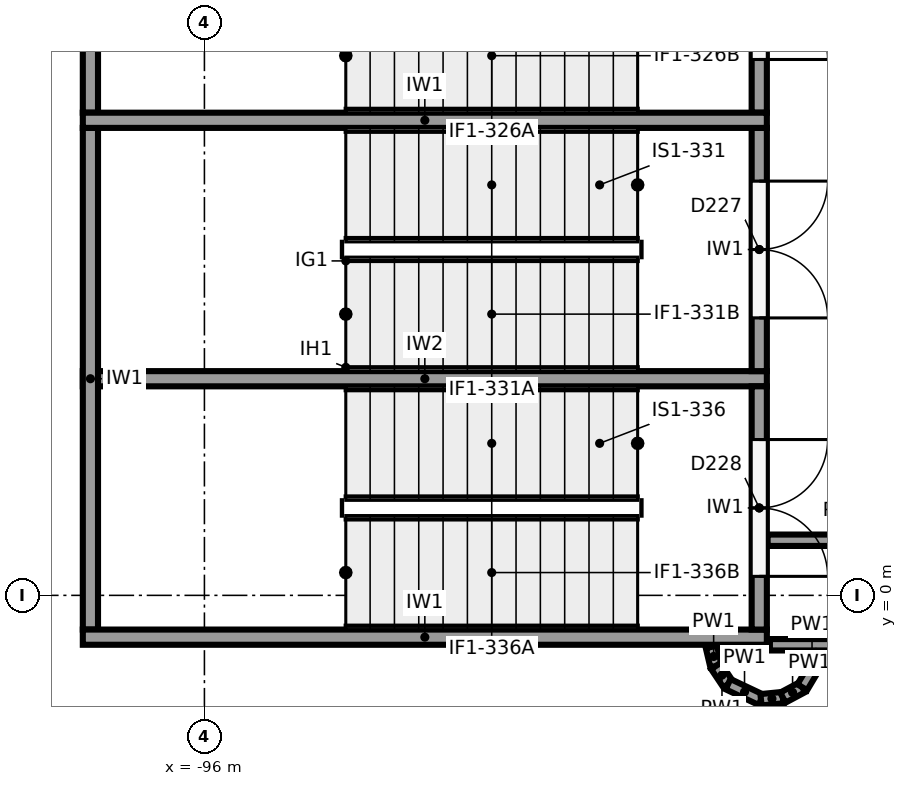
"""IFC4 building model, lengths in metres.
Left out: names, types, materials, properties, quantities, classifications, styles, units other than length and angle.
Written with IfcOpenShell. Run it as: python <this file> out.ifc"""

import sys

from ifc_helpers import new_model, si_unit, direction, frame, frame_2d, origin, place, context, subcontext, project, spatial, rectangle, extrude, element, fill, save


model = new_model("IFC4")
c1 = context("Model", 3, precision=1e-05, world=origin(), true_north=direction((0.0, 1.0)))
c2 = subcontext(c1, "Body", "Model", "MODEL_VIEW")
j1 = project(units=[si_unit("LENGTHUNIT", "METRE"), si_unit("PLANEANGLEUNIT", "RADIAN")], contexts=[c1])
p1 = place(None, origin())
s1 = spatial("IfcSite", under=j1, at=p1, CompositionType="ELEMENT")
p2 = place(p1, origin())
s2 = spatial("IfcBuilding", under=s1, at=p2, CompositionType="ELEMENT")
p3 = place(p2, frame((0.0, 0.0, -4.0)))
s3 = spatial("IfcBuildingStorey", under=s2, at=p3, CompositionType="ELEMENT", Elevation=-4.0)
for number, where, z_axis, x_axis in (
    (1, (-97.6, 6.25, -1.2), (0.0, 0.0, 1.0), (1.0, 0.0, 0.0)),
    (2, (-97.6, -0.55, -1.2), (0.0, 0.0, 1.0), (1.0, 0.0, 0.0)),
):
    element("IfcWall", number, at=place(p3, frame(where, z_axis=z_axis, x_axis=x_axis)), inside=s3, PredefinedType="SHEAR", context=c2, shape_type="SweptSolid", body=[
        extrude(rectangle(XDim=9.0, YDim=0.2, at=frame_2d((4.5, 0.0))), origin(), (0.0, 0.0, 1.0), 4.8),
    ])
for number, where, z_axis, x_axis in (
    (3, (-97.5, 12.95, -1.2), (0.0, 0.0, 1.0), (0.0, -1.0, 0.0)),
    (4, (-97.5, 6.15, -1.2), (0.0, 0.0, 1.0), (0.0, -1.0, 0.0)),
):
    element("IfcWall", number, at=place(p3, frame(where, z_axis=z_axis, x_axis=x_axis)), inside=s3, PredefinedType="SHEAR", context=c2, shape_type="SweptSolid", body=[
        extrude(rectangle(XDim=6.6, YDim=0.2, at=frame_2d((3.3, 0.0))), origin(), (0.0, 0.0, 1.0), 4.8),
    ])
p4 = place(p3, frame((-97.6, 2.85, -1.2), z_axis=(0.0, 0.0, 1.0), x_axis=(1.0, 0.0, 0.0)))
e5 = element("IfcWall", 5, at=p4, inside=s3, PredefinedType="SHEAR", context=c2, shape_type="SweptSolid", body=[
    extrude(rectangle(XDim=9.0, YDim=0.2, at=frame_2d((4.5, 0.0))), origin(), (0.0, 0.0, 1.0), 4.8),
])
p5 = place(p3, frame((-88.7, 9.55, -1.2), z_axis=(0.0, 0.0, 1.0), x_axis=(0.0, -1.0, 0.0)))
e6 = element("IfcWall", 6, at=p5, inside=s3, PredefinedType="SHEAR", context=c2, shape_type="SweptSolid", body=[
    extrude(rectangle(XDim=3.2, YDim=0.2, at=frame_2d((1.6, 0.0))), origin(), (0.0, 0.0, 1.0), 4.8),
])
p6 = place(p5, frame((0.7, 0.0, 1.2)))
e7 = element("IfcOpeningElement", 7, at=p6, cuts=e6, PredefinedType="OPENING", context=c2, shape_type="SweptSolid", body=[
    extrude(rectangle(XDim=1.8, YDim=2.1, at=frame_2d((0.9, 1.05))), frame((0.0, 0.11, 0.0), z_axis=(0.0, -1.0, 0.0), x_axis=(1.0, 0.0, 0.0)), (0.0, 0.0, 1.0), 0.22),
])
p7 = place(p3, frame((-88.7, 6.15, -1.2), z_axis=(0.0, 0.0, 1.0), x_axis=(0.0, -1.0, 0.0)))
e8 = element("IfcWall", 8, at=p7, inside=s3, PredefinedType="SHEAR", context=c2, shape_type="SweptSolid", body=[
    extrude(rectangle(XDim=3.2, YDim=0.2, at=frame_2d((1.6, 0.0))), origin(), (0.0, 0.0, 1.0), 4.8),
])
p8 = place(p7, frame((0.7, 0.0, 1.2)))
e9 = element("IfcOpeningElement", 9, at=p8, cuts=e8, PredefinedType="OPENING", context=c2, shape_type="SweptSolid", body=[
    extrude(rectangle(XDim=1.8, YDim=2.1, at=frame_2d((0.9, 1.05))), frame((0.0, 0.11, 0.0), z_axis=(0.0, -1.0, 0.0), x_axis=(1.0, 0.0, 0.0)), (0.0, 0.0, 1.0), 0.22),
])
p9 = place(p3, frame((-88.7, 2.75, -1.2), z_axis=(0.0, 0.0, 1.0), x_axis=(0.0, -1.0, 0.0)))
e10 = element("IfcWall", 10, at=p9, inside=s3, PredefinedType="SHEAR", context=c2, shape_type="SweptSolid", body=[
    extrude(rectangle(XDim=3.2, YDim=0.2, at=frame_2d((1.6, 0.0))), origin(), (0.0, 0.0, 1.0), 4.8),
])
p10 = place(p9, frame((0.7, 0.0, 1.2)))
e11 = element("IfcOpeningElement", 11, at=p10, cuts=e10, PredefinedType="OPENING", context=c2, shape_type="SweptSolid", body=[
    extrude(rectangle(XDim=1.8, YDim=2.1, at=frame_2d((0.9, 1.05))), frame((0.0, 0.11, 0.0), z_axis=(0.0, -1.0, 0.0), x_axis=(1.0, 0.0, 0.0)), (0.0, 0.0, 1.0), 0.22),
])
p11 = place(p3, frame((-88.56, -0.65, 0.0), z_axis=(0.0, 0.0, 1.0), x_axis=(1.0, 0.0, 0.0)))
e12 = element("IfcWall", 12, at=p11, inside=s3, PredefinedType="PARTITIONING", context=c2, shape_type="SweptSolid", body=[
    extrude(rectangle(XDim=2.983, YDim=0.15, at=frame_2d((1.491, 0.0))), origin(), (0.0, 0.0, 1.0), 3.6),
])
p12 = place(p11, frame((0.95, 0.0, 0.0)))
e13 = element("IfcOpeningElement", 13, at=p12, cuts=e12, PredefinedType="OPENING", context=c2, shape_type="SweptSolid", body=[
    extrude(rectangle(XDim=1.0, YDim=2.1, at=frame_2d((0.5, 1.05))), frame((0.0, 0.085, 0.0), z_axis=(0.0, -1.0, 0.0), x_axis=(1.0, 0.0, 0.0)), (0.0, 0.0, 1.0), 0.17),
])
p13 = place(p3, frame((-88.59, 0.725, 0.0), z_axis=(0.0, 0.0, 1.0), x_axis=(1.0, 0.0, 0.0)))
e14 = element("IfcWall", 14, at=p13, inside=s3, PredefinedType="PARTITIONING", context=c2, shape_type="SweptSolid", body=[
    extrude(rectangle(XDim=2.465, YDim=0.15, at=frame_2d((1.232, 0.0))), origin(), (0.0, 0.0, 1.0), 3.6),
])
p14 = place(p3, frame((-89.33, -0.678, 0.0), z_axis=(0.0, 0.0, 1.0), x_axis=(0.230253879357, -0.973130593004, 0.0)))
e15 = element("IfcWall", 15, at=p14, inside=s3, PredefinedType="PARTITIONING", context=c2, shape_type="SweptSolid", body=[
    extrude(rectangle(XDim=0.258, YDim=0.15, at=frame_2d((0.129, 0.0))), origin(), (0.0, 0.0, 1.0), 3.6),
])
p15 = place(p3, frame((-89.271, -0.929, 0.0), z_axis=(0.0, 0.0, 1.0), x_axis=(0.555678694372, -0.831397130511, 0.0)))
e16 = element("IfcWall", 16, at=p15, inside=s3, PredefinedType="PARTITIONING", context=c2, shape_type="SweptSolid", body=[
    extrude(rectangle(XDim=0.288, YDim=0.15, at=frame_2d((0.144, 0.0))), origin(), (0.0, 0.0, 1.0), 3.6),
])
p16 = place(p3, frame((-89.111, -1.168, 0.0), z_axis=(0.0, 0.0, 1.0), x_axis=(0.90398642908, -0.427561148889, 0.0)))
e17 = element("IfcWall", 17, at=p16, inside=s3, PredefinedType="PARTITIONING", context=c2, shape_type="SweptSolid", body=[
    extrude(rectangle(XDim=0.48, YDim=0.15, at=frame_2d((0.24, 0.0))), origin(), (0.0, 0.0, 1.0), 3.6),
])
for number, where, z_axis, x_axis in (
    (18, (-88.677, -1.374, 0.0), (0.0, 0.0, 1.0), (0.995, 0.098, 0.0)),
    (19, (-88.389, -1.345, 0.0), (0.0, 0.0, 1.0), (0.882, 0.472, 0.0)),
):
    element("IfcWall", number, at=place(p3, frame(where, z_axis=z_axis, x_axis=x_axis)), inside=s3, PredefinedType="PARTITIONING", context=c2, shape_type="SweptSolid", body=[
        extrude(rectangle(XDim=0.289, YDim=0.15, at=frame_2d((0.145, 0.0))), origin(), (0.0, 0.0, 1.0), 3.6),
    ])
p17 = place(p3, frame((-88.134, -1.209, 0.0), z_axis=(0.0, 0.0, 1.0), x_axis=(0.513060623194, 0.858352373404, 0.0)))
e20 = element("IfcWall", 20, at=p17, inside=s3, PredefinedType="PARTITIONING", context=c2, shape_type="SweptSolid", body=[
    extrude(rectangle(XDim=0.5, YDim=0.15, at=frame_2d((0.25, 0.0))), origin(), (0.0, 0.0, 1.0), 3.6),
])
p18 = place(p6, origin())
e21 = element("IfcDoor", 21, at=p18, inside=s3, OperationType="DOUBLE_DOOR_SINGLE_SWING", PredefinedType="DOOR", context=c2, shape_type="SweptSolid", body=[
    extrude(rectangle(XDim=1.8, YDim=2.1, at=frame_2d((0.9, 1.05))), frame((0.0, 0.025, 0.0), z_axis=(0.0, -1.0, 0.0), x_axis=(1.0, 0.0, 0.0)), (0.0, 0.0, 1.0), 0.05),
])
fill(e7, e21)
p19 = place(p8, origin())
e22 = element("IfcDoor", 22, at=p19, inside=s3, OperationType="DOUBLE_DOOR_SINGLE_SWING", PredefinedType="DOOR", context=c2, shape_type="SweptSolid", body=[
    extrude(rectangle(XDim=1.8, YDim=2.1, at=frame_2d((0.9, 1.05))), frame((0.0, 0.025, 0.0), z_axis=(0.0, -1.0, 0.0), x_axis=(1.0, 0.0, 0.0)), (0.0, 0.0, 1.0), 0.05),
])
fill(e9, e22)
p20 = place(p10, origin())
e23 = element("IfcDoor", 23, at=p20, inside=s3, OperationType="DOUBLE_DOOR_SINGLE_SWING", PredefinedType="DOOR", context=c2, shape_type="SweptSolid", body=[
    extrude(rectangle(XDim=1.8, YDim=2.1, at=frame_2d((0.9, 1.05))), frame((0.0, 0.025, 0.0), z_axis=(0.0, -1.0, 0.0), x_axis=(1.0, 0.0, 0.0)), (0.0, 0.0, 1.0), 0.05),
])
fill(e11, e23)
save(model, sys.argv[1])
